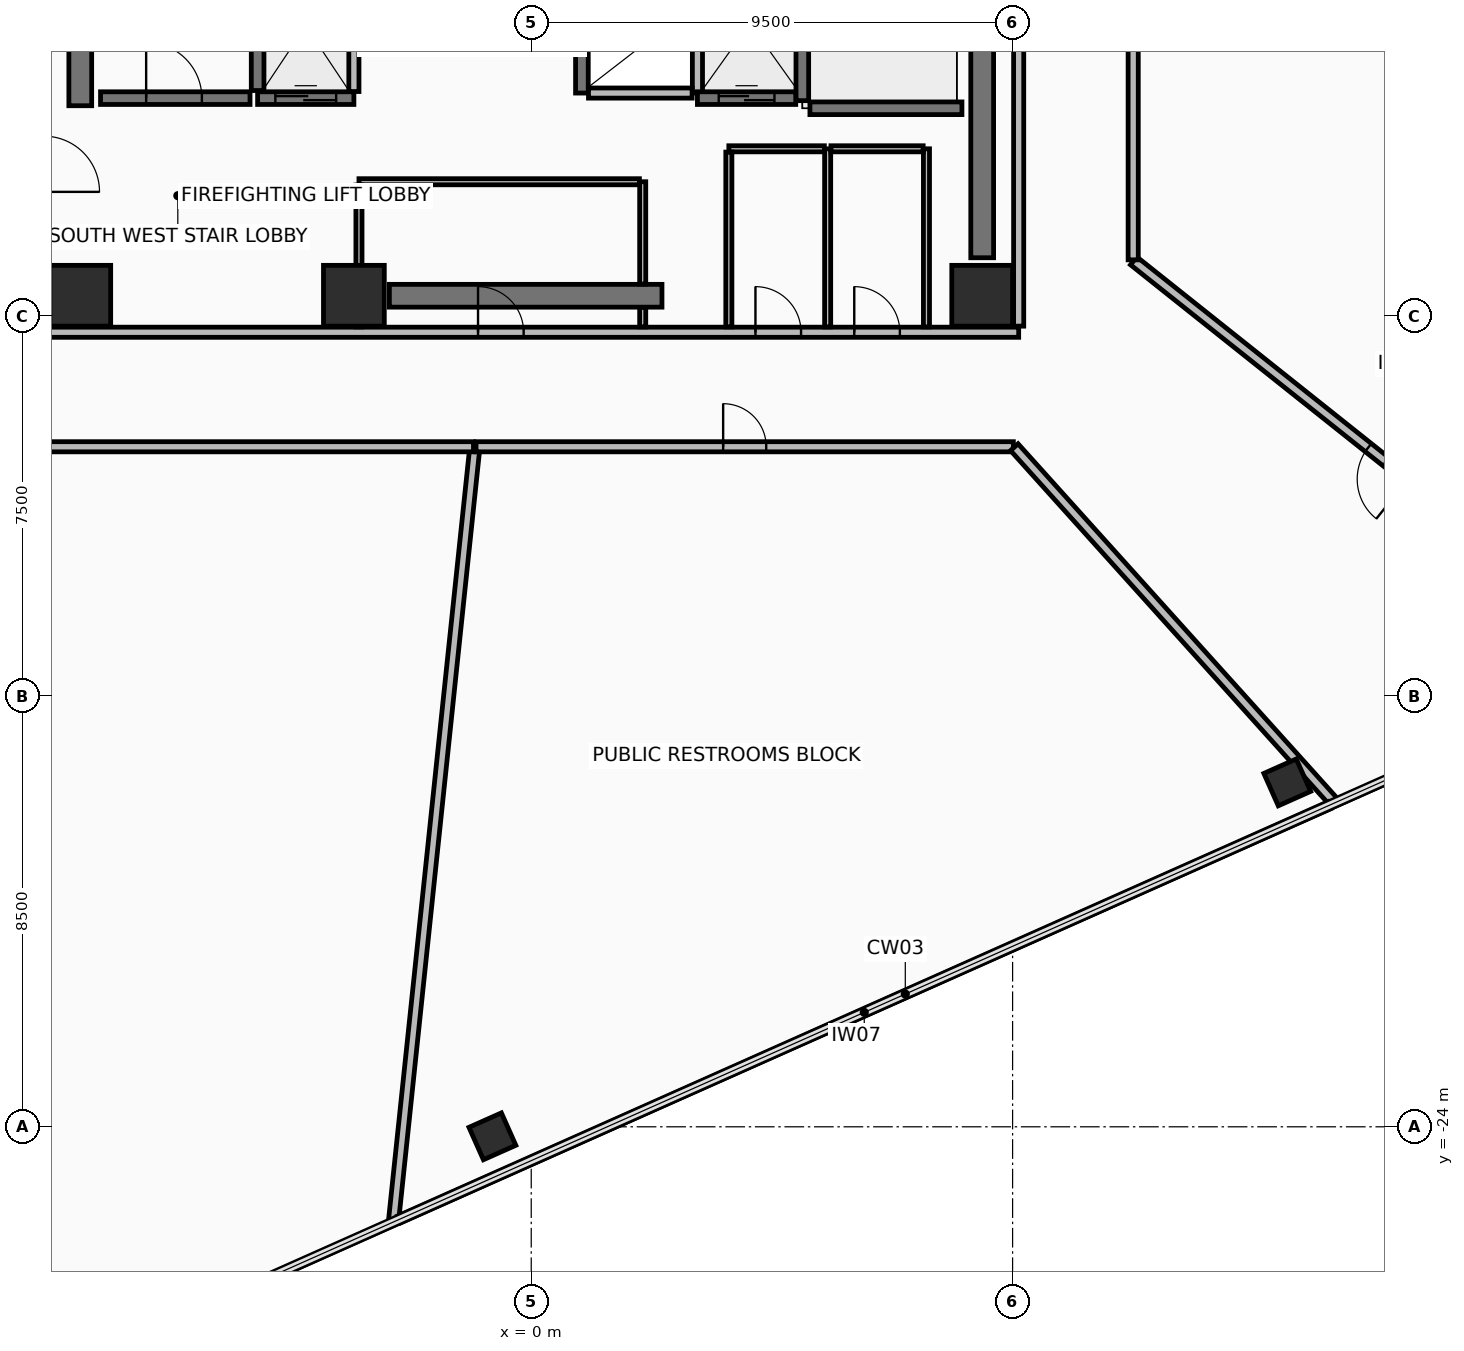
"""IFC4 building model, lengths in metres.
Left out: names, types, materials, properties, quantities, classifications, styles, units other than length and angle.
Written with IfcOpenShell. Run it as: python <this file> out.ifc"""

import sys

from ifc_helpers import new_model, si_unit, direction, frame, frame_2d, origin, origin_2d, place, context, subcontext, project, spatial, rectangle, hollow_rectangle, extrude, element, fill, save


model = new_model("IFC4")
c1 = context("Model", 3, precision=1e-05, world=origin(), true_north=direction((0.0, 1.0)))
c2 = subcontext(c1, "Body", "Model", "MODEL_VIEW")
j1 = project(units=[si_unit("LENGTHUNIT", "METRE"), si_unit("PLANEANGLEUNIT", "RADIAN")], contexts=[c1])
p1 = place(None, origin())
s1 = spatial("IfcSite", under=j1, at=p1, CompositionType="ELEMENT")
p2 = place(p1, origin())
s2 = spatial("IfcBuilding", under=s1, at=p2, CompositionType="ELEMENT")
p3 = place(p2, frame((0.0, 0.0, 116.05)))
s3 = spatial("IfcBuildingStorey", under=s2, at=p3, CompositionType="ELEMENT", Elevation=116.05)
for number, where, z_axis, x_axis in (
    (1, (-8.9, -7.6, 0.0), (0.0, 0.0, 1.0), (1.0, 0.0, 0.0)),
    (2, (-3.5, -7.6, 0.0), (0.0, 0.0, 1.0), (1.0, 0.0, 0.0)),
    (3, (8.9, -7.6, 0.0), (0.0, 0.0, 1.0), (1.0, 0.0, 0.0)),
):
    element("IfcColumn", number, at=place(p3, frame(where, z_axis=z_axis, x_axis=x_axis)), inside=s3, PredefinedType="COLUMN", context=c2, shape_type="SweptSolid", body=[
        extrude(rectangle(XDim=1.2, YDim=1.2, at=origin_2d()), origin(), (0.0, 0.0, 1.0), 3.6),
    ])
for number, where, z_axis, x_axis in (
    (4, (-0.766, -24.188, 0.0), (0.0, 0.0, 1.0), (0.914, 0.407, 0.0)),
    (5, (14.921, -17.204, 0.0), (0.0, 0.0, 1.0), (0.914, 0.407, 0.0)),
):
    element("IfcColumn", number, at=place(p3, frame(where, z_axis=z_axis, x_axis=x_axis)), inside=s3, PredefinedType="COLUMN", context=c2, shape_type="SweptSolid", body=[
        extrude(hollow_rectangle(XDim=0.7, YDim=0.7, WallThickness=0.04, at=origin_2d()), origin(), (0.0, 0.0, 1.0), 3.6),
    ])
p4 = place(p3, frame((-2.8, -7.6, 0.0), z_axis=(0.0, 0.0, 1.0), x_axis=(1.0, 0.0, 0.0)))
e6 = element("IfcWall", 6, at=p4, inside=s3, PredefinedType="SHEAR", context=c2, shape_type="SweptSolid", body=[
    extrude(rectangle(XDim=5.38, YDim=0.45, at=frame_2d((2.69, 0.0))), origin(), (0.0, 0.0, 1.0), 3.41),
])
for number, where, z_axis, x_axis in (
    (7, (-8.9, -3.85, 0.0), (0.0, 0.0, 1.0), (0.0, 1.0, 0.0)),
    (8, (8.9, -6.85, 0.0), (0.0, 0.0, 1.0), (0.0, 1.0, 0.0)),
):
    element("IfcWall", number, at=place(p3, frame(where, z_axis=z_axis, x_axis=x_axis)), inside=s3, PredefinedType="SHEAR", context=c2, shape_type="SweptSolid", body=[
        extrude(rectangle(XDim=10.7, YDim=0.45, at=frame_2d((5.35, 0.0))), origin(), (0.0, 0.0, 1.0), 3.41),
    ])
p5 = place(p3, frame((-9.62, -8.32, 0.0), z_axis=(0.0, 0.0, 1.0), x_axis=(1.0, 0.0, 0.0)))
e9 = element("IfcWall", 9, at=p5, inside=s3, PredefinedType="PARTITIONING", context=c2, shape_type="SweptSolid", body=[
    extrude(rectangle(XDim=19.24, YDim=0.2, at=frame_2d((9.62, 0.0))), origin(), (0.0, 0.0, 1.0), 2.855),
])
p6 = place(p5, frame((8.57, 0.0, 0.0)))
e10 = element("IfcOpeningElement", 10, at=p6, cuts=e9, PredefinedType="OPENING", context=c2, shape_type="SweptSolid", body=[
    extrude(rectangle(XDim=0.9, YDim=2.1, at=frame_2d((0.45, 1.05))), frame((0.0, 0.11, 0.0), z_axis=(0.0, -1.0, 0.0), x_axis=(1.0, 0.0, 0.0)), (0.0, 0.0, 1.0), 0.22),
])
p7 = place(p5, frame((14.045, 0.0, 0.0)))
e11 = element("IfcOpeningElement", 11, at=p7, cuts=e9, PredefinedType="OPENING", context=c2, shape_type="SweptSolid", body=[
    extrude(rectangle(XDim=0.9, YDim=2.1, at=frame_2d((0.45, 1.05))), frame((0.0, 0.11, 0.0), z_axis=(0.0, -1.0, 0.0), x_axis=(1.0, 0.0, 0.0)), (0.0, 0.0, 1.0), 0.22),
])
p8 = place(p5, frame((15.995, 0.0, 0.0)))
e12 = element("IfcOpeningElement", 12, at=p8, cuts=e9, PredefinedType="OPENING", context=c2, shape_type="SweptSolid", body=[
    extrude(rectangle(XDim=0.9, YDim=2.1, at=frame_2d((0.45, 1.05))), frame((0.0, 0.11, 0.0), z_axis=(0.0, -1.0, 0.0), x_axis=(1.0, 0.0, 0.0)), (0.0, 0.0, 1.0), 0.22),
])
p9 = place(p3, frame((9.62, -8.2, 0.0), z_axis=(0.0, 0.0, 1.0), x_axis=(0.0, 1.0, 0.0)))
e13 = element("IfcWall", 13, at=p9, inside=s3, PredefinedType="PARTITIONING", context=c2, shape_type="SweptSolid", body=[
    extrude(rectangle(XDim=16.4, YDim=0.2, at=frame_2d((8.2, 0.0))), origin(), (0.0, 0.0, 1.0), 2.855),
])
p10 = place(p9, frame((12.65, 0.0, 0.0)))
e14 = element("IfcOpeningElement", 14, at=p10, cuts=e13, PredefinedType="OPENING", context=c2, shape_type="SweptSolid", body=[
    extrude(rectangle(XDim=1.1, YDim=2.15, at=frame_2d((0.55, 1.075))), frame((0.0, 0.11, 0.0), z_axis=(0.0, -1.0, 0.0), x_axis=(1.0, 0.0, 0.0)), (0.0, 0.0, 1.0), 0.22),
])
p11 = place(p3, frame((-5.4, -3.55, 0.0), z_axis=(0.0, 0.0, 1.0), x_axis=(0.0, 1.0, 0.0)))
e15 = element("IfcWall", 15, at=p11, inside=s3, PredefinedType="SHEAR", context=c2, shape_type="SweptSolid", body=[
    extrude(rectangle(XDim=7.3, YDim=0.25, at=frame_2d((3.65, 0.0))), origin(), (0.0, 0.0, 1.0), 3.41),
])
p12 = place(p3, frame((-8.5, -3.7, 0.0), z_axis=(0.0, 0.0, 1.0), x_axis=(1.0, 0.0, 0.0)))
e16 = element("IfcWall", 16, at=p12, inside=s3, PredefinedType="SHEAR", context=c2, shape_type="SweptSolid", body=[
    extrude(rectangle(XDim=2.95, YDim=0.25, at=frame_2d((1.475, 0.0))), origin(), (0.0, 0.0, 1.0), 3.41),
])
p13 = place(p12, frame((0.9, 0.0, 0.0)))
e17 = element("IfcOpeningElement", 17, at=p13, cuts=e16, PredefinedType="OPENING", context=c2, shape_type="SweptSolid", body=[
    extrude(rectangle(XDim=1.1, YDim=2.15, at=frame_2d((0.55, 1.075))), frame((0.0, 0.135, 0.0), z_axis=(0.0, -1.0, 0.0), x_axis=(1.0, 0.0, 0.0)), (0.0, 0.0, 1.0), 0.27),
])
p14 = place(p3, frame((5.35, -3.75, 0.0), z_axis=(0.0, 0.0, 1.0), x_axis=(0.0, 1.0, 0.0)))
e18 = element("IfcWall", 18, at=p14, inside=s3, PredefinedType="SHEAR", context=c2, shape_type="SweptSolid", body=[
    extrude(rectangle(XDim=7.3, YDim=0.25, at=frame_2d((3.65, 0.0))), origin(), (0.0, 0.0, 1.0), 3.41),
])
p15 = place(p3, frame((5.5, -3.9, 0.0), z_axis=(0.0, 0.0, 1.0), x_axis=(1.0, 0.0, 0.0)))
e19 = element("IfcWall", 19, at=p15, inside=s3, PredefinedType="SHEAR", context=c2, shape_type="SweptSolid", body=[
    extrude(rectangle(XDim=3.0, YDim=0.25, at=frame_2d((1.5, 0.0))), origin(), (0.0, 0.0, 1.0), 3.41),
])
p16 = place(p3, frame((1.0, -3.6, 0.0), z_axis=(0.0, 0.0, 1.0), x_axis=(0.0, 1.0, 0.0)))
e20 = element("IfcWall", 20, at=p16, inside=s3, PredefinedType="SHEAR", context=c2, shape_type="SweptSolid", body=[
    extrude(rectangle(XDim=1.8, YDim=0.25, at=frame_2d((0.9, 0.0))), origin(), (0.0, 0.0, 1.0), 3.41),
])
p17 = place(p3, frame((3.28, -3.6, 0.0), z_axis=(0.0, 0.0, 1.0), x_axis=(0.0, 1.0, 0.0)))
e21 = element("IfcWall", 21, at=p17, inside=s3, PredefinedType="PARTITIONING", context=c2, shape_type="SweptSolid", body=[
    extrude(rectangle(XDim=1.8, YDim=0.2, at=frame_2d((0.9, 0.0))), origin(), (0.0, 0.0, 1.0), 3.41),
])
p18 = place(p3, frame((1.13, -3.6, 0.0), z_axis=(0.0, 0.0, 1.0), x_axis=(1.0, 0.0, 0.0)))
e22 = element("IfcWall", 22, at=p18, inside=s3, PredefinedType="PARTITIONING", context=c2, shape_type="SweptSolid", body=[
    extrude(rectangle(XDim=2.045, YDim=0.2, at=frame_2d((1.022, 0.0))), origin(), (0.0, 0.0, 1.0), 3.41),
])
p19 = place(p3, frame((-5.4, -3.7, 0.0), z_axis=(0.0, 0.0, 1.0), x_axis=(1.0, 0.0, 0.0)))
e23 = element("IfcWall", 23, at=p19, inside=s3, PredefinedType="SHEAR", context=c2, shape_type="SweptSolid", body=[
    extrude(rectangle(XDim=1.9, YDim=0.25, at=frame_2d((0.95, 0.0))), origin(), (0.0, 0.0, 1.0), 3.41),
])
p20 = place(p19, frame((0.35, 0.0, 0.0)))
e24 = element("IfcOpeningElement", 24, at=p20, cuts=e23, PredefinedType="OPENING", context=c2, shape_type="SweptSolid", body=[
    extrude(rectangle(XDim=1.2, YDim=2.2, at=frame_2d((0.6, 1.1))), frame((0.0, 0.135, 0.0), z_axis=(0.0, -1.0, 0.0), x_axis=(1.0, 0.0, 0.0)), (0.0, 0.0, 1.0), 0.27),
])
p21 = place(p3, frame((-3.5, -3.57, 0.0), z_axis=(0.0, 0.0, 1.0), x_axis=(0.0, 1.0, 0.0)))
e25 = element("IfcWall", 25, at=p21, inside=s3, PredefinedType="PARTITIONING", context=c2, shape_type="SweptSolid", body=[
    extrude(rectangle(XDim=2.615, YDim=0.2, at=frame_2d((1.308, 0.0))), origin(), (0.0, 0.0, 1.0), 3.41),
])
p22 = place(p3, frame((3.28, -3.7, 0.0), z_axis=(0.0, 0.0, 1.0), x_axis=(1.0, 0.0, 0.0)))
e26 = element("IfcWall", 26, at=p22, inside=s3, PredefinedType="SHEAR", context=c2, shape_type="SweptSolid", body=[
    extrude(rectangle(XDim=1.94, YDim=0.25, at=frame_2d((0.97, 0.0))), origin(), (0.0, 0.0, 1.0), 3.41),
])
p23 = place(p22, frame((0.42, 0.0, 0.0)))
e27 = element("IfcOpeningElement", 27, at=p23, cuts=e26, PredefinedType="OPENING", context=c2, shape_type="SweptSolid", body=[
    extrude(rectangle(XDim=1.1, YDim=2.2, at=frame_2d((0.55, 1.1))), frame((0.0, 0.135, 0.0), z_axis=(0.0, -1.0, 0.0), x_axis=(1.0, 0.0, 0.0)), (0.0, 0.0, 1.0), 0.27),
])
p24 = place(p3, frame((2.2, -8.215, 0.0), z_axis=(0.0, 0.0, 1.0), x_axis=(0.0, 1.0, 0.0)))
e28 = element("IfcWall", 28, at=p24, inside=s3, PredefinedType="PARTITIONING", context=c2, shape_type="SweptSolid", body=[
    extrude(rectangle(XDim=0.385, YDim=0.12, at=frame_2d((0.192, 0.0))), origin(), (0.0, 0.0, 1.0), 2.605),
])
p25 = place(p3, frame((2.2, -7.37, 0.0), z_axis=(0.0, 0.0, 1.0), x_axis=(0.0, 1.0, 0.0)))
e29 = element("IfcWall", 29, at=p25, inside=s3, PredefinedType="PARTITIONING", context=c2, shape_type="SweptSolid", body=[
    extrude(rectangle(XDim=2.02, YDim=0.12, at=frame_2d((1.01, 0.0))), origin(), (0.0, 0.0, 1.0), 2.605),
])
p26 = place(p3, frame((2.135, -5.35, 0.0), z_axis=(0.0, 0.0, 1.0), x_axis=(-1.0, 0.0, 0.0)))
e30 = element("IfcWall", 30, at=p26, inside=s3, PredefinedType="PARTITIONING", context=c2, shape_type="SweptSolid", body=[
    extrude(rectangle(XDim=5.535, YDim=0.12, at=frame_2d((2.768, 0.0))), origin(), (0.0, 0.0, 1.0), 2.605),
])
p27 = place(p3, frame((-3.4, -5.415, 0.0), z_axis=(0.0, 0.0, 1.0), x_axis=(0.0, -1.0, 0.0)))
e31 = element("IfcWall", 31, at=p27, inside=s3, PredefinedType="PARTITIONING", context=c2, shape_type="SweptSolid", body=[
    extrude(rectangle(XDim=2.8, YDim=0.12, at=frame_2d((1.4, 0.0))), origin(), (0.0, 0.0, 1.0), 2.605),
])
p28 = place(p3, frame((5.85, -8.215, 0.0), z_axis=(0.0, 0.0, 1.0), x_axis=(0.0, 1.0, 0.0)))
e32 = element("IfcWall", 32, at=p28, inside=s3, PredefinedType="PARTITIONING", context=c2, shape_type="SweptSolid", body=[
    extrude(rectangle(XDim=3.515, YDim=0.12, at=frame_2d((1.758, 0.0))), origin(), (0.0, 0.0, 1.0), 2.605),
])
p29 = place(p3, frame((5.785, -4.7, 0.0), z_axis=(0.0, 0.0, 1.0), x_axis=(-1.0, 0.0, 0.0)))
e33 = element("IfcWall", 33, at=p29, inside=s3, PredefinedType="PARTITIONING", context=c2, shape_type="SweptSolid", body=[
    extrude(rectangle(XDim=1.885, YDim=0.12, at=frame_2d((0.942, 0.0))), origin(), (0.0, 0.0, 1.0), 3.41),
])
p30 = place(p3, frame((3.9, -4.765, 0.0), z_axis=(0.0, 0.0, 1.0), x_axis=(0.0, -1.0, 0.0)))
e34 = element("IfcWall", 34, at=p30, inside=s3, PredefinedType="PARTITIONING", context=c2, shape_type="SweptSolid", body=[
    extrude(rectangle(XDim=3.45, YDim=0.12, at=frame_2d((1.725, 0.0))), origin(), (0.0, 0.0, 1.0), 2.605),
])
p31 = place(p3, frame((7.8, -8.215, 0.0), z_axis=(0.0, 0.0, 1.0), x_axis=(0.0, 1.0, 0.0)))
e35 = element("IfcWall", 35, at=p31, inside=s3, PredefinedType="PARTITIONING", context=c2, shape_type="SweptSolid", body=[
    extrude(rectangle(XDim=3.515, YDim=0.12, at=frame_2d((1.758, 0.0))), origin(), (0.0, 0.0, 1.0), 2.605),
])
p32 = place(p3, frame((7.735, -4.7, 0.0), z_axis=(0.0, 0.0, 1.0), x_axis=(-1.0, 0.0, 0.0)))
e36 = element("IfcWall", 36, at=p32, inside=s3, PredefinedType="PARTITIONING", context=c2, shape_type="SweptSolid", body=[
    extrude(rectangle(XDim=1.82, YDim=0.12, at=frame_2d((0.91, 0.0))), origin(), (0.0, 0.0, 1.0), 3.41),
])
p33 = place(p3, frame((-2.72, -25.879, 0.0), z_axis=(0.0, 0.0, 1.0), x_axis=(0.104519310708, 0.994522857299, 0.0)))
e37 = element("IfcWall", 37, at=p33, inside=s3, PredefinedType="PARTITIONING", context=c2, shape_type="SweptSolid", body=[
    extrude(rectangle(XDim=15.361, YDim=0.2, at=frame_2d((7.68, 0.0))), origin(), (0.0, 0.0, 1.0), 2.705),
])
p34 = place(p3, frame((-1.09, -10.58, 0.0), z_axis=(0.0, 0.0, 1.0), x_axis=(1.0, 0.0, 0.0)))
e38 = element("IfcWall", 38, at=p34, inside=s3, PredefinedType="PARTITIONING", context=c2, shape_type="SweptSolid", body=[
    extrude(rectangle(XDim=10.605, YDim=0.2, at=frame_2d((5.302, 0.0))), origin(), (0.0, 0.0, 1.0), 3.41),
])
p35 = place(p34, frame((4.877, 0.0, 0.0)))
e39 = element("IfcOpeningElement", 39, at=p35, cuts=e38, PredefinedType="OPENING", context=c2, shape_type="SweptSolid", body=[
    extrude(rectangle(XDim=0.85, YDim=2.1, at=frame_2d((0.425, 1.05))), frame((0.0, 0.11, 0.0), z_axis=(0.0, -1.0, 0.0), x_axis=(1.0, 0.0, 0.0)), (0.0, 0.0, 1.0), 0.22),
])
p36 = place(p3, frame((9.534, -10.588, 0.0), z_axis=(0.0, 0.0, 1.0), x_axis=(0.669143190424, -0.743133494541, 0.0)))
e40 = element("IfcWall", 40, at=p36, inside=s3, PredefinedType="PARTITIONING", context=c2, shape_type="SweptSolid", body=[
    extrude(rectangle(XDim=9.447, YDim=0.2, at=frame_2d((4.723, 0.0))), origin(), (0.0, 0.0, 1.0), 2.705),
])
p37 = place(p3, frame((15.754, -17.654, 0.0), z_axis=(0.0, 0.0, 1.0), x_axis=(-0.913544896064, -0.406737904399, 0.0)))
e41 = element("IfcWall", 41, at=p37, inside=s3, PredefinedType="PARTITIONING", context=c2, shape_type="SweptSolid", body=[
    extrude(rectangle(XDim=20.101, YDim=0.15, at=frame_2d((10.05, 0.0))), origin(), (0.0, 0.0, 1.0), 3.41),
])
p38 = place(p3, frame((-9.97, -10.58, 0.0), z_axis=(0.0, 0.0, 1.0), x_axis=(1.0, 0.0, 0.0)))
e42 = element("IfcWall", 42, at=p38, inside=s3, PredefinedType="PARTITIONING", context=c2, shape_type="SweptSolid", body=[
    extrude(rectangle(XDim=8.83, YDim=0.2, at=frame_2d((4.415, 0.0))), origin(), (0.0, 0.0, 1.0), 2.855),
])
p39 = place(p3, frame((21.93, -14.904, 0.0), z_axis=(0.0, 0.0, 1.0), x_axis=(-0.782382790893, 0.622797855258, 0.0)))
e43 = element("IfcWall", 43, at=p39, inside=s3, PredefinedType="PARTITIONING", context=c2, shape_type="SweptSolid", body=[
    extrude(rectangle(XDim=12.834, YDim=0.2, at=frame_2d((6.417, 0.0))), origin(), (0.0, 0.0, 1.0), 2.705),
])
p40 = place(p39, frame((5.917, 0.0, 0.0)))
e44 = element("IfcOpeningElement", 44, at=p40, cuts=e43, PredefinedType="OPENING", context=c2, shape_type="SweptSolid", body=[
    extrude(rectangle(XDim=1.0, YDim=2.15, at=frame_2d((0.5, 1.075))), frame((0.0, 0.11, 0.0), z_axis=(0.0, -1.0, 0.0), x_axis=(1.0, 0.0, 0.0)), (0.0, 0.0, 1.0), 0.22),
])
p41 = place(p3, frame((11.88, -6.891, 0.0), z_axis=(0.0, 0.0, 1.0), x_axis=(0.0, 1.0, 0.0)))
e45 = element("IfcWall", 45, at=p41, inside=s3, PredefinedType="PARTITIONING", context=c2, shape_type="SweptSolid", body=[
    extrude(rectangle(XDim=5.615, YDim=0.2, at=frame_2d((2.808, 0.0))), origin(), (0.0, 0.0, 1.0), 3.41),
])
p42 = place(p3, frame((11.908, -1.251, 0.0), z_axis=(0.0, 0.0, 1.0), x_axis=(0.994520958229, -0.104537379166, 0.0)))
e46 = element("IfcWall", 46, at=p42, inside=s3, PredefinedType="PARTITIONING", context=c2, shape_type="SweptSolid", body=[
    extrude(rectangle(XDim=16.553, YDim=0.2, at=frame_2d((8.277, 0.0))), origin(), (0.0, 0.0, 1.0), 2.705),
])
p43 = place(p13, origin())
e47 = element("IfcDoor", 47, at=p43, inside=s3, OperationType="SINGLE_SWING_LEFT", PredefinedType="DOOR", context=c2, shape_type="SweptSolid", body=[
    extrude(rectangle(XDim=1.1, YDim=2.15, at=frame_2d((0.55, 1.075))), frame((0.0, 0.025, 0.0), z_axis=(0.0, -1.0, 0.0), x_axis=(1.0, 0.0, 0.0)), (0.0, 0.0, 1.0), 0.05),
])
fill(e17, e47)
p44 = place(p20, origin())
e48 = element("IfcDoor", 48, at=p44, inside=s3, OperationType="SLIDING_TO_RIGHT", PredefinedType="DOOR", context=c2, shape_type="SweptSolid", body=[
    extrude(rectangle(XDim=1.2, YDim=2.2, at=frame_2d((0.6, 1.1))), frame((0.0, 0.025, 0.0), z_axis=(0.0, -1.0, 0.0), x_axis=(1.0, 0.0, 0.0)), (0.0, 0.0, 1.0), 0.05),
])
fill(e24, e48)
p45 = place(p23, origin())
e49 = element("IfcDoor", 49, at=p45, inside=s3, OperationType="SLIDING_TO_LEFT", PredefinedType="DOOR", context=c2, shape_type="SweptSolid", body=[
    extrude(rectangle(XDim=1.1, YDim=2.2, at=frame_2d((0.55, 1.1))), frame((0.0, 0.025, 0.0), z_axis=(0.0, -1.0, 0.0), x_axis=(1.0, 0.0, 0.0)), (0.0, 0.0, 1.0), 0.05),
])
fill(e27, e49)
p46 = place(p6, origin())
e50 = element("IfcDoor", 50, at=p46, inside=s3, OperationType="SINGLE_SWING_LEFT", PredefinedType="DOOR", context=c2, shape_type="SweptSolid", body=[
    extrude(rectangle(XDim=0.9, YDim=2.1, at=frame_2d((0.45, 1.05))), frame((0.0, 0.025, 0.0), z_axis=(0.0, -1.0, 0.0), x_axis=(1.0, 0.0, 0.0)), (0.0, 0.0, 1.0), 0.05),
])
fill(e10, e50)
p47 = place(p7, origin())
e51 = element("IfcDoor", 51, at=p47, inside=s3, OperationType="SINGLE_SWING_LEFT", PredefinedType="DOOR", context=c2, shape_type="SweptSolid", body=[
    extrude(rectangle(XDim=0.9, YDim=2.1, at=frame_2d((0.45, 1.05))), frame((0.0, 0.025, 0.0), z_axis=(0.0, -1.0, 0.0), x_axis=(1.0, 0.0, 0.0)), (0.0, 0.0, 1.0), 0.05),
])
fill(e11, e51)
p48 = place(p8, origin())
e52 = element("IfcDoor", 52, at=p48, inside=s3, OperationType="SINGLE_SWING_LEFT", PredefinedType="DOOR", context=c2, shape_type="SweptSolid", body=[
    extrude(rectangle(XDim=0.9, YDim=2.1, at=frame_2d((0.45, 1.05))), frame((0.0, 0.025, 0.0), z_axis=(0.0, -1.0, 0.0), x_axis=(1.0, 0.0, 0.0)), (0.0, 0.0, 1.0), 0.05),
])
fill(e12, e52)
p49 = place(p35, origin())
e53 = element("IfcDoor", 53, at=p49, inside=s3, OperationType="SINGLE_SWING_RIGHT", PredefinedType="DOOR", context=c2, shape_type="SweptSolid", body=[
    extrude(rectangle(XDim=0.85, YDim=2.1, at=frame_2d((0.425, 1.05))), frame((0.0, 0.025, 0.0), z_axis=(0.0, -1.0, 0.0), x_axis=(1.0, 0.0, 0.0)), (0.0, 0.0, 1.0), 0.05),
])
fill(e39, e53)
p50 = place(p40, origin())
e54 = element("IfcDoor", 54, at=p50, inside=s3, OperationType="SINGLE_SWING_RIGHT", PredefinedType="DOOR", context=c2, shape_type="SweptSolid", body=[
    extrude(rectangle(XDim=1.0, YDim=2.15, at=frame_2d((0.5, 1.075))), frame((0.0, 0.025, 0.0), z_axis=(0.0, -1.0, 0.0), x_axis=(1.0, 0.0, 0.0)), (0.0, 0.0, 1.0), 0.05),
])
fill(e44, e54)
save(model, sys.argv[1])
